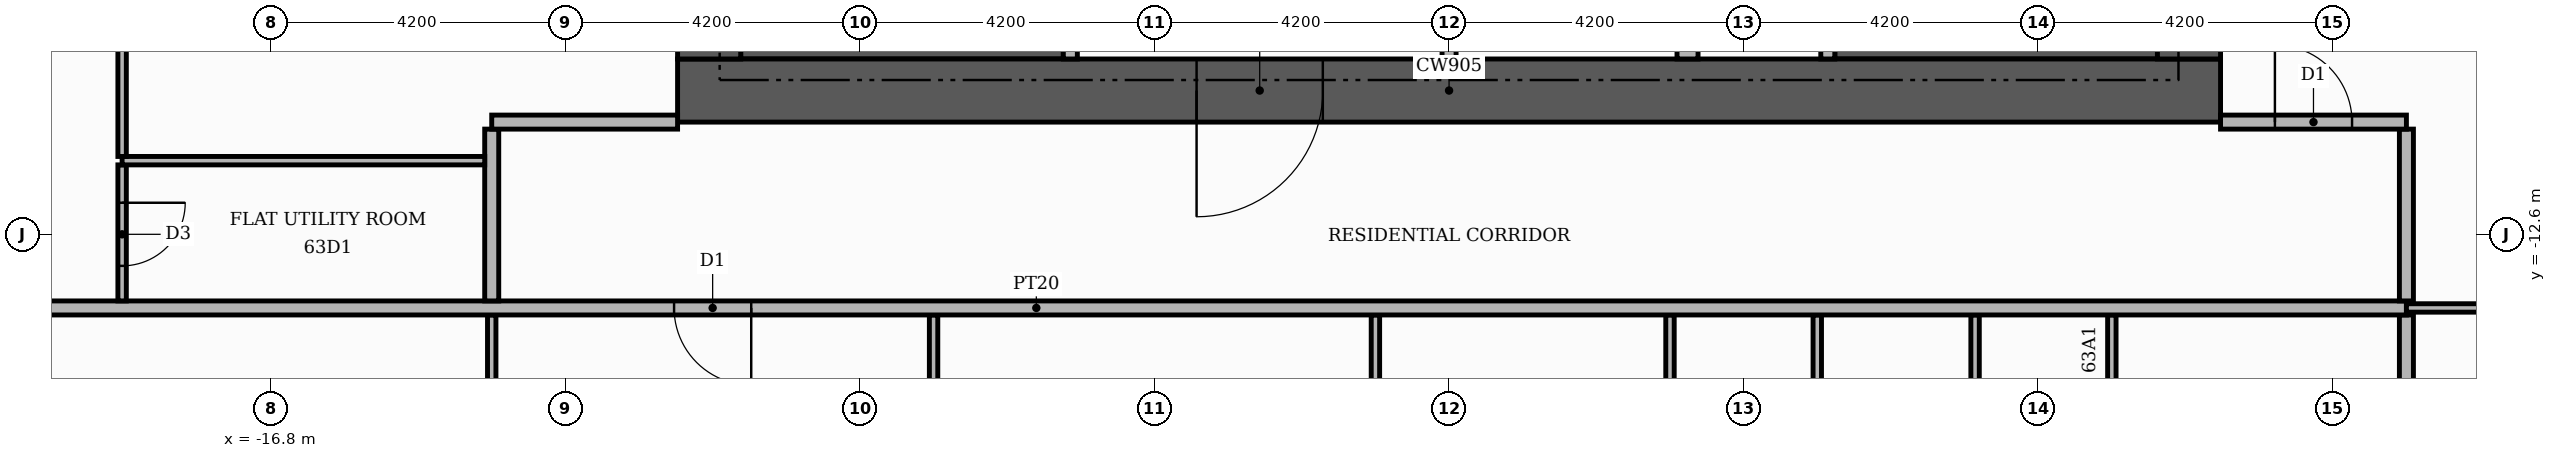
"""IFC4 building model, lengths in metres.
Left out: names, types, materials, properties, quantities, classifications, styles, units other than length and angle.
Written with IfcOpenShell. Run it as: python <this file> out.ifc"""

import sys

from ifc_helpers import new_model, si_unit, direction, frame, frame_2d, origin, place, context, subcontext, project, spatial, rectangle, extrude, element, fill, save


model = new_model("IFC4")
c1 = context("Model", 3, precision=1e-05, world=origin(), true_north=direction((0.0, 1.0)))
c2 = subcontext(c1, "Body", "Model", "MODEL_VIEW")
j1 = project(units=[si_unit("LENGTHUNIT", "METRE"), si_unit("PLANEANGLEUNIT", "RADIAN")], contexts=[c1])
p1 = place(None, origin())
s1 = spatial("IfcSite", under=j1, at=p1, CompositionType="ELEMENT")
p2 = place(p1, origin())
s2 = spatial("IfcBuilding", under=s1, at=p2, CompositionType="ELEMENT")
p3 = place(p2, frame((0.0, 0.0, 264.0)))
s3 = spatial("IfcBuildingStorey", under=s2, at=p3, CompositionType="ELEMENT", Elevation=264.0)
for number, where, z_axis, x_axis in (
    (1, (-10.1, -9.15, 0.0), (0.0, 0.0, 1.0), (1.0, 0.0, 0.0)),
    (2, (5.5, -9.15, 0.0), (0.0, 0.0, 1.0), (1.0, 0.0, 0.0)),
):
    element("IfcWall", number, at=place(p3, frame(where, z_axis=z_axis, x_axis=x_axis)), inside=s3, PredefinedType="SHEAR", context=c2, shape_type="SweptSolid", body=[
        extrude(rectangle(XDim=4.6, YDim=1.9, at=frame_2d((2.3, 0.0))), origin(), (0.0, 0.0, 1.0), 3.48),
    ])
p4 = place(p3, frame((-11.0, -10.55, 0.0), z_axis=(0.0, 0.0, 1.0), x_axis=(1.0, 0.0, 0.0)))
e3 = element("IfcWall", 3, at=p4, inside=s3, PredefinedType="SHEAR", context=c2, shape_type="SweptSolid", body=[
    extrude(rectangle(XDim=22.0, YDim=0.9, at=frame_2d((11.0, 0.0))), origin(), (0.0, 0.0, 1.0), 3.48),
])
p5 = place(p4, frame((7.4, 0.0, 0.0)))
e4 = element("IfcOpeningElement", 4, at=p5, cuts=e3, PredefinedType="OPENING", context=c2, shape_type="SweptSolid", body=[
    extrude(rectangle(XDim=1.8, YDim=2.2, at=frame_2d((0.9, 1.1))), frame((0.0, 0.46, 0.0), z_axis=(0.0, -1.0, 0.0), x_axis=(1.0, 0.0, 0.0)), (0.0, 0.0, 1.0), 0.92),
])
for number, where, z_axis, x_axis in (
    (5, (-10.55, -10.1, 0.0), (0.0, 0.0, 1.0), (0.0, 1.0, 0.0)),
    (6, (10.55, -10.1, 0.0), (0.0, 0.0, 1.0), (0.0, 1.0, 0.0)),
):
    element("IfcWall", number, at=place(p3, frame(where, z_axis=z_axis, x_axis=x_axis)), inside=s3, PredefinedType="SHEAR", context=c2, shape_type="SweptSolid", body=[
        extrude(rectangle(XDim=20.2, YDim=0.9, at=frame_2d((10.1, 0.0))), origin(), (0.0, 0.0, 1.0), 3.48),
    ])
p6 = place(p3, frame((-5.4, -10.1, 0.0), z_axis=(0.0, 0.0, 1.0), x_axis=(0.0, 1.0, 0.0)))
e7 = element("IfcWall", 7, at=p6, inside=s3, PredefinedType="PARTITIONING", context=c2, shape_type="SweptSolid", body=[
    extrude(rectangle(XDim=4.6, YDim=0.2, at=frame_2d((2.3, 0.0))), origin(), (0.0, 0.0, 1.0), 3.48),
])
p7 = place(p6, frame((2.9, 0.0, 0.0)))
e8 = element("IfcOpeningElement", 8, at=p7, cuts=e7, PredefinedType="OPENING", context=c2, shape_type="SweptSolid", body=[
    extrude(rectangle(XDim=1.0, YDim=2.1, at=frame_2d((0.5, 1.05))), frame((0.0, 0.11, 0.0), z_axis=(0.0, -1.0, 0.0), x_axis=(1.0, 0.0, 0.0)), (0.0, 0.0, 1.0), 0.22),
])
p8 = place(p3, frame((0.0, -10.1, 0.0), z_axis=(0.0, 0.0, 1.0), x_axis=(0.0, 1.0, 0.0)))
e9 = element("IfcWall", 9, at=p8, inside=s3, PredefinedType="PARTITIONING", context=c2, shape_type="SweptSolid", body=[
    extrude(rectangle(XDim=2.2, YDim=0.2, at=frame_2d((1.1, 0.0))), origin(), (0.0, 0.0, 1.0), 3.48),
])
p9 = place(p3, frame((3.4, -10.1, 0.0), z_axis=(0.0, 0.0, 1.0), x_axis=(0.0, 1.0, 0.0)))
e10 = element("IfcWall", 10, at=p9, inside=s3, PredefinedType="PARTITIONING", context=c2, shape_type="SweptSolid", body=[
    extrude(rectangle(XDim=2.2, YDim=0.3, at=frame_2d((1.1, 0.0))), origin(), (0.0, 0.0, 1.0), 3.48),
])
p10 = place(p3, frame((5.4, -10.1, 0.0), z_axis=(0.0, 0.0, 1.0), x_axis=(0.0, 1.0, 0.0)))
e11 = element("IfcWall", 11, at=p10, inside=s3, PredefinedType="PARTITIONING", context=c2, shape_type="SweptSolid", body=[
    extrude(rectangle(XDim=4.6, YDim=0.2, at=frame_2d((2.3, 0.0))), origin(), (0.0, 0.0, 1.0), 3.48),
])
p11 = place(p10, frame((2.9, 0.0, 0.0)))
e12 = element("IfcOpeningElement", 12, at=p11, cuts=e11, PredefinedType="OPENING", context=c2, shape_type="SweptSolid", body=[
    extrude(rectangle(XDim=1.0, YDim=2.1, at=frame_2d((0.5, 1.05))), frame((0.0, 0.11, 0.0), z_axis=(0.0, -1.0, 0.0), x_axis=(1.0, 0.0, 0.0)), (0.0, 0.0, 1.0), 0.22),
])
p12 = place(p3, frame((13.65, -25.42, 0.0), z_axis=(0.0, 0.0, 1.0), x_axis=(0.0, 1.0, 0.0)))
e13 = element("IfcWall", 13, at=p12, inside=s3, PredefinedType="PARTITIONING", context=c2, shape_type="SweptSolid", body=[
    extrude(rectangle(XDim=11.67, YDim=0.2, at=frame_2d((5.835, 0.0))), origin(), (0.0, 0.0, 1.0), 3.48),
])
p13 = place(p3, frame((-13.65, -20.06, 0.0), z_axis=(0.0, 0.0, 1.0), x_axis=(0.0, 1.0, 0.0)))
e14 = element("IfcWall", 14, at=p13, inside=s3, PredefinedType="PARTITIONING", context=c2, shape_type="SweptSolid", body=[
    extrude(rectangle(XDim=6.31, YDim=0.12, at=frame_2d((3.155, 0.0))), origin(), (0.0, 0.0, 1.0), 3.48),
])
p14 = place(p13, frame((2.675, 0.0, 0.0)))
e15 = element("IfcOpeningElement", 15, at=p14, cuts=e14, PredefinedType="OPENING", context=c2, shape_type="SweptSolid", body=[
    extrude(rectangle(XDim=1.0, YDim=2.1, at=frame_2d((0.5, 1.05))), frame((0.0, 0.07, 0.0), z_axis=(0.0, -1.0, 0.0), x_axis=(1.0, 0.0, 0.0)), (0.0, 0.0, 1.0), 0.14),
])
for number, where, z_axis, x_axis in (
    (16, (-7.35, -18.56, 0.0), (0.0, 0.0, 1.0), (0.0, 1.0, 0.0)),
    (17, (-1.05, -18.56, 0.0), (0.0, 0.0, 1.0), (0.0, 1.0, 0.0)),
    (18, (3.15, -18.56, 0.0), (0.0, 0.0, 1.0), (0.0, 1.0, 0.0)),
    (19, (5.25, -18.56, 0.0), (0.0, 0.0, 1.0), (0.0, 1.0, 0.0)),
    (20, (7.5, -18.56, 0.0), (0.0, 0.0, 1.0), (0.0, 1.0, 0.0)),
    (21, (9.45, -18.56, 0.0), (0.0, 0.0, 1.0), (0.0, 1.0, 0.0)),
):
    element("IfcWall", number, at=place(p3, frame(where, z_axis=z_axis, x_axis=x_axis)), inside=s3, PredefinedType="PARTITIONING", context=c2, shape_type="SweptSolid", body=[
        extrude(rectangle(XDim=4.81, YDim=0.12, at=frame_2d((2.405, 0.0))), origin(), (0.0, 0.0, 1.0), 3.48),
    ])
p15 = place(p3, frame((-25.42, -13.65, 0.0), z_axis=(0.0, 0.0, 1.0), x_axis=(1.0, 0.0, 0.0)))
e22 = element("IfcWall", 22, at=p15, inside=s3, PredefinedType="PARTITIONING", context=c2, shape_type="SweptSolid", body=[
    extrude(rectangle(XDim=39.07, YDim=0.2, at=frame_2d((19.535, 0.0))), origin(), (0.0, 0.0, 1.0), 3.48),
])
p16 = place(p15, frame((14.37, 0.0, 0.0)))
e23 = element("IfcOpeningElement", 23, at=p16, cuts=e22, PredefinedType="OPENING", context=c2, shape_type="SweptSolid", body=[
    extrude(rectangle(XDim=1.1, YDim=2.4, at=frame_2d((0.55, 1.2))), frame((0.0, 0.11, 0.0), z_axis=(0.0, -1.0, 0.0), x_axis=(1.0, 0.0, 0.0)), (0.0, 0.0, 1.0), 0.22),
])
p17 = place(p3, frame((13.65, -13.65, 0.0), z_axis=(0.0, 0.0, 1.0), x_axis=(1.0, 0.0, 0.0)))
e24 = element("IfcWall", 24, at=p17, inside=s3, PredefinedType="PARTITIONING", context=c2, shape_type="SweptSolid", body=[
    extrude(rectangle(XDim=6.17, YDim=0.12, at=frame_2d((3.085, 0.0))), origin(), (0.0, 0.0, 1.0), 3.48),
])
p18 = place(p17, frame((2.635, 0.0, 0.0)))
e25 = element("IfcOpeningElement", 25, at=p18, cuts=e24, PredefinedType="OPENING", context=c2, shape_type="SweptSolid", body=[
    extrude(rectangle(XDim=0.9, YDim=2.1, at=frame_2d((0.45, 1.05))), frame((0.0, 0.07, 0.0), z_axis=(0.0, -1.0, 0.0), x_axis=(1.0, 0.0, 0.0)), (0.0, 0.0, 1.0), 0.14),
])
p19 = place(p3, frame((-18.92, -13.55, 0.0), z_axis=(0.0, 0.0, 1.0), x_axis=(0.0, 1.0, 0.0)))
e26 = element("IfcWall", 26, at=p19, inside=s3, PredefinedType="PARTITIONING", context=c2, shape_type="SweptSolid", body=[
    extrude(rectangle(XDim=1.94, YDim=0.12, at=frame_2d((0.97, 0.0))), origin(), (0.0, 0.0, 1.0), 3.48),
])
p20 = place(p19, frame((0.5, 0.0, 0.0)))
e27 = element("IfcOpeningElement", 27, at=p20, cuts=e26, PredefinedType="OPENING", context=c2, shape_type="SweptSolid", body=[
    extrude(rectangle(XDim=0.9, YDim=2.1, at=frame_2d((0.45, 1.05))), frame((0.0, 0.07, 0.0), z_axis=(0.0, -1.0, 0.0), x_axis=(1.0, 0.0, 0.0)), (0.0, 0.0, 1.0), 0.14),
])
for number, where, z_axis, x_axis in (
    (28, (-13.65, -13.55, 0.0), (0.0, 0.0, 1.0), (0.0, 1.0, 0.0)),
    (29, (13.65, -13.55, 0.0), (0.0, 0.0, 1.0), (0.0, 1.0, 0.0)),
):
    element("IfcWall", number, at=place(p3, frame(where, z_axis=z_axis, x_axis=x_axis)), inside=s3, PredefinedType="PARTITIONING", context=c2, shape_type="SweptSolid", body=[
        extrude(rectangle(XDim=2.45, YDim=0.2, at=frame_2d((1.225, 0.0))), origin(), (0.0, 0.0, 1.0), 3.48),
    ])
p21 = place(p3, frame((-18.92, -11.55, 0.0), z_axis=(0.0, 0.0, 1.0), x_axis=(1.0, 0.0, 0.0)))
e30 = element("IfcWall", 30, at=p21, inside=s3, PredefinedType="PARTITIONING", context=c2, shape_type="SweptSolid", body=[
    extrude(rectangle(XDim=5.17, YDim=0.12, at=frame_2d((2.585, 0.0))), origin(), (0.0, 0.0, 1.0), 3.48),
])
p22 = place(p3, frame((-18.92, -11.49, 0.0), z_axis=(0.0, 0.0, 1.0), x_axis=(0.0, 1.0, 0.0)))
e31 = element("IfcWall", 31, at=p22, inside=s3, PredefinedType="PARTITIONING", context=c2, shape_type="SweptSolid", body=[
    extrude(rectangle(XDim=4.38, YDim=0.12, at=frame_2d((2.19, 0.0))), origin(), (0.0, 0.0, 1.0), 3.48),
])
p23 = place(p22, frame((1.74, 0.0, 0.0)))
e32 = element("IfcOpeningElement", 32, at=p23, cuts=e31, PredefinedType="OPENING", context=c2, shape_type="SweptSolid", body=[
    extrude(rectangle(XDim=0.9, YDim=2.1, at=frame_2d((0.45, 1.05))), frame((0.0, 0.07, 0.0), z_axis=(0.0, -1.0, 0.0), x_axis=(1.0, 0.0, 0.0)), (0.0, 0.0, 1.0), 0.14),
])
p24 = place(p3, frame((-13.65, -11.0, 0.0), z_axis=(0.0, 0.0, 1.0), x_axis=(1.0, 0.0, 0.0)))
e33 = element("IfcWall", 33, at=p24, inside=s3, PredefinedType="PARTITIONING", context=c2, shape_type="SweptSolid", body=[
    extrude(rectangle(XDim=2.65, YDim=0.2, at=frame_2d((1.325, 0.0))), origin(), (0.0, 0.0, 1.0), 3.48),
])
p25 = place(p3, frame((11.0, -11.0, 0.0), z_axis=(0.0, 0.0, 1.0), x_axis=(1.0, 0.0, 0.0)))
e34 = element("IfcWall", 34, at=p25, inside=s3, PredefinedType="PARTITIONING", context=c2, shape_type="SweptSolid", body=[
    extrude(rectangle(XDim=2.65, YDim=0.2, at=frame_2d((1.325, 0.0))), origin(), (0.0, 0.0, 1.0), 3.48),
])
p26 = place(p25, frame((0.775, 0.0, 0.0)))
e35 = element("IfcOpeningElement", 35, at=p26, cuts=e34, PredefinedType="OPENING", context=c2, shape_type="SweptSolid", body=[
    extrude(rectangle(XDim=1.1, YDim=2.4, at=frame_2d((0.55, 1.2))), frame((0.0, 0.11, 0.0), z_axis=(0.0, -1.0, 0.0), x_axis=(1.0, 0.0, 0.0)), (0.0, 0.0, 1.0), 0.22),
])
p27 = place(p5, frame((1.8, 0.0, 0.0), z_axis=(0.0, 0.0, 1.0), x_axis=(-1.0, 0.0, 0.0)))
e36 = element("IfcDoor", 36, at=p27, inside=s3, OperationType="DOUBLE_DOOR_SINGLE_SWING", PredefinedType="DOOR", context=c2, shape_type="SweptSolid", body=[
    extrude(rectangle(XDim=1.8, YDim=2.2, at=frame_2d((0.9, 1.1))), frame((0.0, 0.025, 0.0), z_axis=(0.0, -1.0, 0.0), x_axis=(1.0, 0.0, 0.0)), (0.0, 0.0, 1.0), 0.05),
])
fill(e4, e36)
p28 = place(p16, frame((1.1, 0.0, 0.0), z_axis=(0.0, 0.0, 1.0), x_axis=(-1.0, 0.0, 0.0)))
e37 = element("IfcDoor", 37, at=p28, inside=s3, OperationType="SINGLE_SWING_RIGHT", PredefinedType="DOOR", context=c2, shape_type="SweptSolid", body=[
    extrude(rectangle(XDim=1.1, YDim=2.4, at=frame_2d((0.55, 1.2))), frame((0.0, 0.025, 0.0), z_axis=(0.0, -1.0, 0.0), x_axis=(1.0, 0.0, 0.0)), (0.0, 0.0, 1.0), 0.05),
])
fill(e23, e37)
p29 = place(p26, origin())
e38 = element("IfcDoor", 38, at=p29, inside=s3, OperationType="SINGLE_SWING_LEFT", PredefinedType="DOOR", context=c2, shape_type="SweptSolid", body=[
    extrude(rectangle(XDim=1.1, YDim=2.4, at=frame_2d((0.55, 1.2))), frame((0.0, 0.025, 0.0), z_axis=(0.0, -1.0, 0.0), x_axis=(1.0, 0.0, 0.0)), (0.0, 0.0, 1.0), 0.05),
])
fill(e35, e38)
p30 = place(p20, frame((0.9, 0.0, 0.0), z_axis=(0.0, 0.0, 1.0), x_axis=(-1.0, 0.0, 0.0)))
e39 = element("IfcDoor", 39, at=p30, inside=s3, OperationType="SINGLE_SWING_RIGHT", PredefinedType="DOOR", context=c2, shape_type="SweptSolid", body=[
    extrude(rectangle(XDim=0.9, YDim=2.1, at=frame_2d((0.45, 1.05))), frame((0.0, 0.025, 0.0), z_axis=(0.0, -1.0, 0.0), x_axis=(1.0, 0.0, 0.0)), (0.0, 0.0, 1.0), 0.05),
])
fill(e27, e39)
save(model, sys.argv[1])
